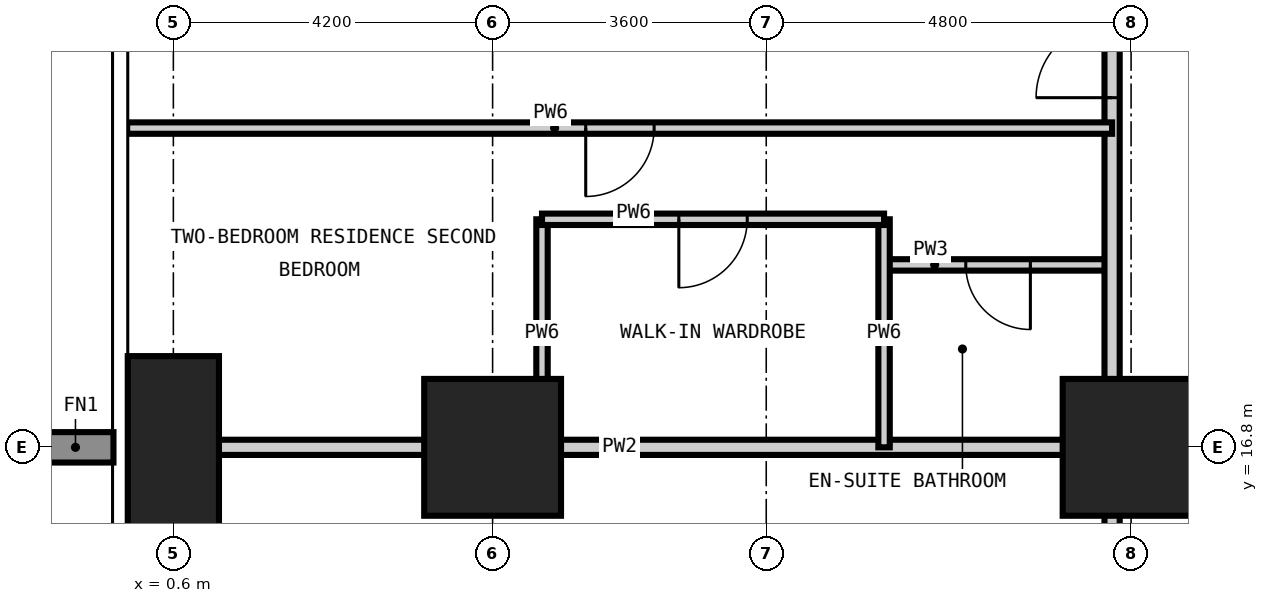
"""IFC4 building model, lengths in metres.
Left out: names, types, materials, properties, quantities, classifications, styles, units other than length and angle.
Written with IfcOpenShell. Run it as: python <this file> out.ifc"""

import sys

from ifc_helpers import new_model, si_unit, direction, frame, frame_2d, origin, origin_2d, place, context, subcontext, project, spatial, rectangle, extrude, element, fill, save


model = new_model("IFC4")
c1 = context("Model", 3, precision=1e-05, world=origin(), true_north=direction((0.0, 1.0)))
c2 = subcontext(c1, "Body", "Model", "MODEL_VIEW")
j1 = project(units=[si_unit("LENGTHUNIT", "METRE"), si_unit("PLANEANGLEUNIT", "RADIAN")], contexts=[c1])
p1 = place(None, origin())
s1 = spatial("IfcSite", under=j1, at=p1, CompositionType="ELEMENT")
p2 = place(p1, origin())
s2 = spatial("IfcBuilding", under=s1, at=p2, CompositionType="ELEMENT")
p3 = place(p2, frame((0.0, 0.0, 45.0)))
s3 = spatial("IfcBuildingStorey", under=s2, at=p3, CompositionType="ELEMENT", Elevation=45.0)
p4 = place(p3, frame((0.6, 16.8, -0.35), z_axis=(0.0, 0.0, 1.0), x_axis=(1.0, 0.0, 0.0)))
e1 = element("IfcColumn", 1, at=p4, inside=s3, PredefinedType="COLUMN", context=c2, shape_type="SweptSolid", body=[
    extrude(rectangle(XDim=1.2, YDim=2.4, at=origin_2d()), origin(), (0.0, 0.0, 1.0), 3.6),
])
for number, where, z_axis, x_axis in (
    (2, (4.8, 16.8, -0.35), (0.0, 0.0, 1.0), (1.0, 0.0, 0.0)),
    (3, (13.2, 16.8, -0.35), (0.0, 0.0, 1.0), (1.0, 0.0, 0.0)),
):
    element("IfcColumn", number, at=place(p3, frame(where, z_axis=z_axis, x_axis=x_axis)), inside=s3, PredefinedType="COLUMN", context=c2, shape_type="SweptSolid", body=[
        extrude(rectangle(XDim=1.8, YDim=1.8, at=origin_2d()), origin(), (0.0, 0.0, 1.0), 3.6),
    ])
p5 = place(p3, frame((9.95, 19.2, 0.0), z_axis=(0.0, 0.0, 1.0), x_axis=(1.0, 0.0, 0.0)))
e4 = element("IfcWall", 4, at=p5, inside=s3, PredefinedType="PARTITIONING", context=c2, shape_type="SweptSolid", body=[
    extrude(rectangle(XDim=3.0, YDim=0.15, at=frame_2d((1.5, 0.0))), origin(), (0.0, 0.0, 1.0), 3.25),
])
p6 = place(p5, frame((1.075, 0.0, 0.0)))
e5 = element("IfcOpeningElement", 5, at=p6, cuts=e4, PredefinedType="OPENING", context=c2, shape_type="SweptSolid", body=[
    extrude(rectangle(XDim=0.85, YDim=2.1, at=frame_2d((0.425, 1.05))), frame((0.0, 0.085, 0.0), z_axis=(0.0, -1.0, 0.0), x_axis=(1.0, 0.0, 0.0)), (0.0, 0.0, 1.0), 0.17),
])
p7 = place(p3, frame((12.95, 12.95, 0.0), z_axis=(0.0, 0.0, 1.0), x_axis=(0.0, 1.0, 0.0)))
e6 = element("IfcWall", 6, at=p7, inside=s3, PredefinedType="PARTITIONING", context=c2, shape_type="SweptSolid", body=[
    extrude(rectangle(XDim=32.6, YDim=0.2, at=frame_2d((16.3, 0.0))), origin(), (0.0, 0.0, 1.0), 3.25),
])
p8 = place(p7, frame((8.45, 0.0, 0.0)))
e7 = element("IfcOpeningElement", 7, at=p8, cuts=e6, PredefinedType="OPENING", context=c2, shape_type="SweptSolid", body=[
    extrude(rectangle(XDim=1.0, YDim=2.2, at=frame_2d((0.5, 1.1))), frame((0.0, 0.11, 0.0), z_axis=(0.0, -1.0, 0.0), x_axis=(1.0, 0.0, 0.0)), (0.0, 0.0, 1.0), 0.22),
])
p9 = place(p7, frame((16.7, 0.0, 0.0)))
e8 = element("IfcOpeningElement", 8, at=p9, cuts=e6, PredefinedType="OPENING", context=c2, shape_type="SweptSolid", body=[
    extrude(rectangle(XDim=1.0, YDim=2.2, at=frame_2d((0.5, 1.1))), frame((0.0, 0.11, 0.0), z_axis=(0.0, -1.0, 0.0), x_axis=(1.0, 0.0, 0.0)), (0.0, 0.0, 1.0), 0.22),
])
p10 = place(p7, frame((23.6, 0.0, 0.0)))
e9 = element("IfcOpeningElement", 9, at=p10, cuts=e6, PredefinedType="OPENING", context=c2, shape_type="SweptSolid", body=[
    extrude(rectangle(XDim=1.0, YDim=2.2, at=frame_2d((0.5, 1.1))), frame((0.0, 0.11, 0.0), z_axis=(0.0, -1.0, 0.0), x_axis=(1.0, 0.0, 0.0)), (0.0, 0.0, 1.0), 0.22),
])
p11 = place(p7, frame((25.1, 0.0, 0.0)))
e10 = element("IfcOpeningElement", 10, at=p11, cuts=e6, PredefinedType="OPENING", context=c2, shape_type="SweptSolid", body=[
    extrude(rectangle(XDim=1.0, YDim=2.2, at=frame_2d((0.5, 1.1))), frame((0.0, 0.11, 0.0), z_axis=(0.0, -1.0, 0.0), x_axis=(1.0, 0.0, 0.0)), (0.0, 0.0, 1.0), 0.22),
])
p12 = place(p7, frame((1.425, 0.0, 0.0)))
e11 = element("IfcOpeningElement", 11, at=p12, cuts=e6, PredefinedType="OPENING", context=c2, shape_type="SweptSolid", body=[
    extrude(rectangle(XDim=1.0, YDim=2.2, at=frame_2d((0.5, 1.1))), frame((0.0, 0.11, 0.0), z_axis=(0.0, -1.0, 0.0), x_axis=(1.0, 0.0, 0.0)), (0.0, 0.0, 1.0), 0.22),
])
p13 = place(p7, frame((30.325, 0.0, 0.0)))
e12 = element("IfcOpeningElement", 12, at=p13, cuts=e6, PredefinedType="OPENING", context=c2, shape_type="SweptSolid", body=[
    extrude(rectangle(XDim=1.0, YDim=2.2, at=frame_2d((0.5, 1.1))), frame((0.0, 0.11, 0.0), z_axis=(0.0, -1.0, 0.0), x_axis=(1.0, 0.0, 0.0)), (0.0, 0.0, 1.0), 0.22),
])
p14 = place(p3, frame((-0.008, 16.8, 0.0), z_axis=(0.0, 0.0, 1.0), x_axis=(1.0, 0.0, 0.0)))
e13 = element("IfcWall", 13, at=p14, inside=s3, PredefinedType="PARTITIONING", context=c2, shape_type="SweptSolid", body=[
    extrude(rectangle(XDim=12.958, YDim=0.2, at=frame_2d((6.479, 0.0))), origin(), (0.0, 0.0, 1.0), 3.25),
])
for number, where, z_axis, x_axis in (
    (14, (5.45, 16.8, 0.0), (0.0, 0.0, 1.0), (0.0, 1.0, 0.0)),
    (15, (9.95, 16.8, 0.0), (0.0, 0.0, 1.0), (0.0, 1.0, 0.0)),
):
    element("IfcWall", number, at=place(p3, frame(where, z_axis=z_axis, x_axis=x_axis)), inside=s3, PredefinedType="PARTITIONING", context=c2, shape_type="SweptSolid", body=[
        extrude(rectangle(XDim=3.0, YDim=0.15, at=frame_2d((1.5, 0.0))), origin(), (0.0, 0.0, 1.0), 3.25),
    ])
p15 = place(p3, frame((5.45, 19.8, 0.0), z_axis=(0.0, 0.0, 1.0), x_axis=(1.0, 0.0, 0.0)))
e16 = element("IfcWall", 16, at=p15, inside=s3, PredefinedType="PARTITIONING", context=c2, shape_type="SweptSolid", body=[
    extrude(rectangle(XDim=4.5, YDim=0.15, at=frame_2d((2.25, 0.0))), origin(), (0.0, 0.0, 1.0), 3.25),
])
p16 = place(p15, frame((1.8, 0.0, 0.0)))
e17 = element("IfcOpeningElement", 17, at=p16, cuts=e16, PredefinedType="OPENING", context=c2, shape_type="SweptSolid", body=[
    extrude(rectangle(XDim=0.9, YDim=2.1, at=frame_2d((0.45, 1.05))), frame((0.0, 0.085, 0.0), z_axis=(0.0, -1.0, 0.0), x_axis=(1.0, 0.0, 0.0)), (0.0, 0.0, 1.0), 0.17),
])
p17 = place(p3, frame((-0.008, 21.0, 0.0), z_axis=(0.0, 0.0, 1.0), x_axis=(1.0, 0.0, 0.0)))
e18 = element("IfcWall", 18, at=p17, inside=s3, PredefinedType="PARTITIONING", context=c2, shape_type="SweptSolid", body=[
    extrude(rectangle(XDim=12.958, YDim=0.15, at=frame_2d((6.479, 0.0))), origin(), (0.0, 0.0, 1.0), 3.25),
])
p18 = place(p17, frame((6.033, 0.0, 0.0)))
e19 = element("IfcOpeningElement", 19, at=p18, cuts=e18, PredefinedType="OPENING", context=c2, shape_type="SweptSolid", body=[
    extrude(rectangle(XDim=0.9, YDim=2.1, at=frame_2d((0.45, 1.05))), frame((0.0, 0.085, 0.0), z_axis=(0.0, -1.0, 0.0), x_axis=(1.0, 0.0, 0.0)), (0.0, 0.0, 1.0), 0.17),
])
p19 = place(p8, origin())
e20 = element("IfcDoor", 20, at=p19, inside=s3, OperationType="SINGLE_SWING_LEFT", PredefinedType="DOOR", context=c2, shape_type="SweptSolid", body=[
    extrude(rectangle(XDim=1.0, YDim=2.2, at=frame_2d((0.5, 1.1))), frame((0.0, 0.025, 0.0), z_axis=(0.0, -1.0, 0.0), x_axis=(1.0, 0.0, 0.0)), (0.0, 0.0, 1.0), 0.05),
])
fill(e7, e20)
p20 = place(p18, frame((0.9, 0.0, 0.0), z_axis=(0.0, 0.0, 1.0), x_axis=(-1.0, 0.0, 0.0)))
e21 = element("IfcDoor", 21, at=p20, inside=s3, OperationType="SINGLE_SWING_RIGHT", PredefinedType="DOOR", context=c2, shape_type="SweptSolid", body=[
    extrude(rectangle(XDim=0.9, YDim=2.1, at=frame_2d((0.45, 1.05))), frame((0.0, 0.025, 0.0), z_axis=(0.0, -1.0, 0.0), x_axis=(1.0, 0.0, 0.0)), (0.0, 0.0, 1.0), 0.05),
])
fill(e19, e21)
p21 = place(p6, frame((0.85, 0.0, 0.0), z_axis=(0.0, 0.0, 1.0), x_axis=(-1.0, 0.0, 0.0)))
e22 = element("IfcDoor", 22, at=p21, inside=s3, OperationType="SINGLE_SWING_LEFT", PredefinedType="DOOR", context=c2, shape_type="SweptSolid", body=[
    extrude(rectangle(XDim=0.85, YDim=2.1, at=frame_2d((0.425, 1.05))), frame((0.0, 0.025, 0.0), z_axis=(0.0, -1.0, 0.0), x_axis=(1.0, 0.0, 0.0)), (0.0, 0.0, 1.0), 0.05),
])
fill(e5, e22)
p22 = place(p16, frame((0.9, 0.0, 0.0), z_axis=(0.0, 0.0, 1.0), x_axis=(-1.0, 0.0, 0.0)))
e23 = element("IfcDoor", 23, at=p22, inside=s3, OperationType="SINGLE_SWING_RIGHT", PredefinedType="DOOR", context=c2, shape_type="SweptSolid", body=[
    extrude(rectangle(XDim=0.9, YDim=2.1, at=frame_2d((0.45, 1.05))), frame((0.0, 0.025, 0.0), z_axis=(0.0, -1.0, 0.0), x_axis=(1.0, 0.0, 0.0)), (0.0, 0.0, 1.0), 0.05),
])
fill(e17, e23)
save(model, sys.argv[1])
